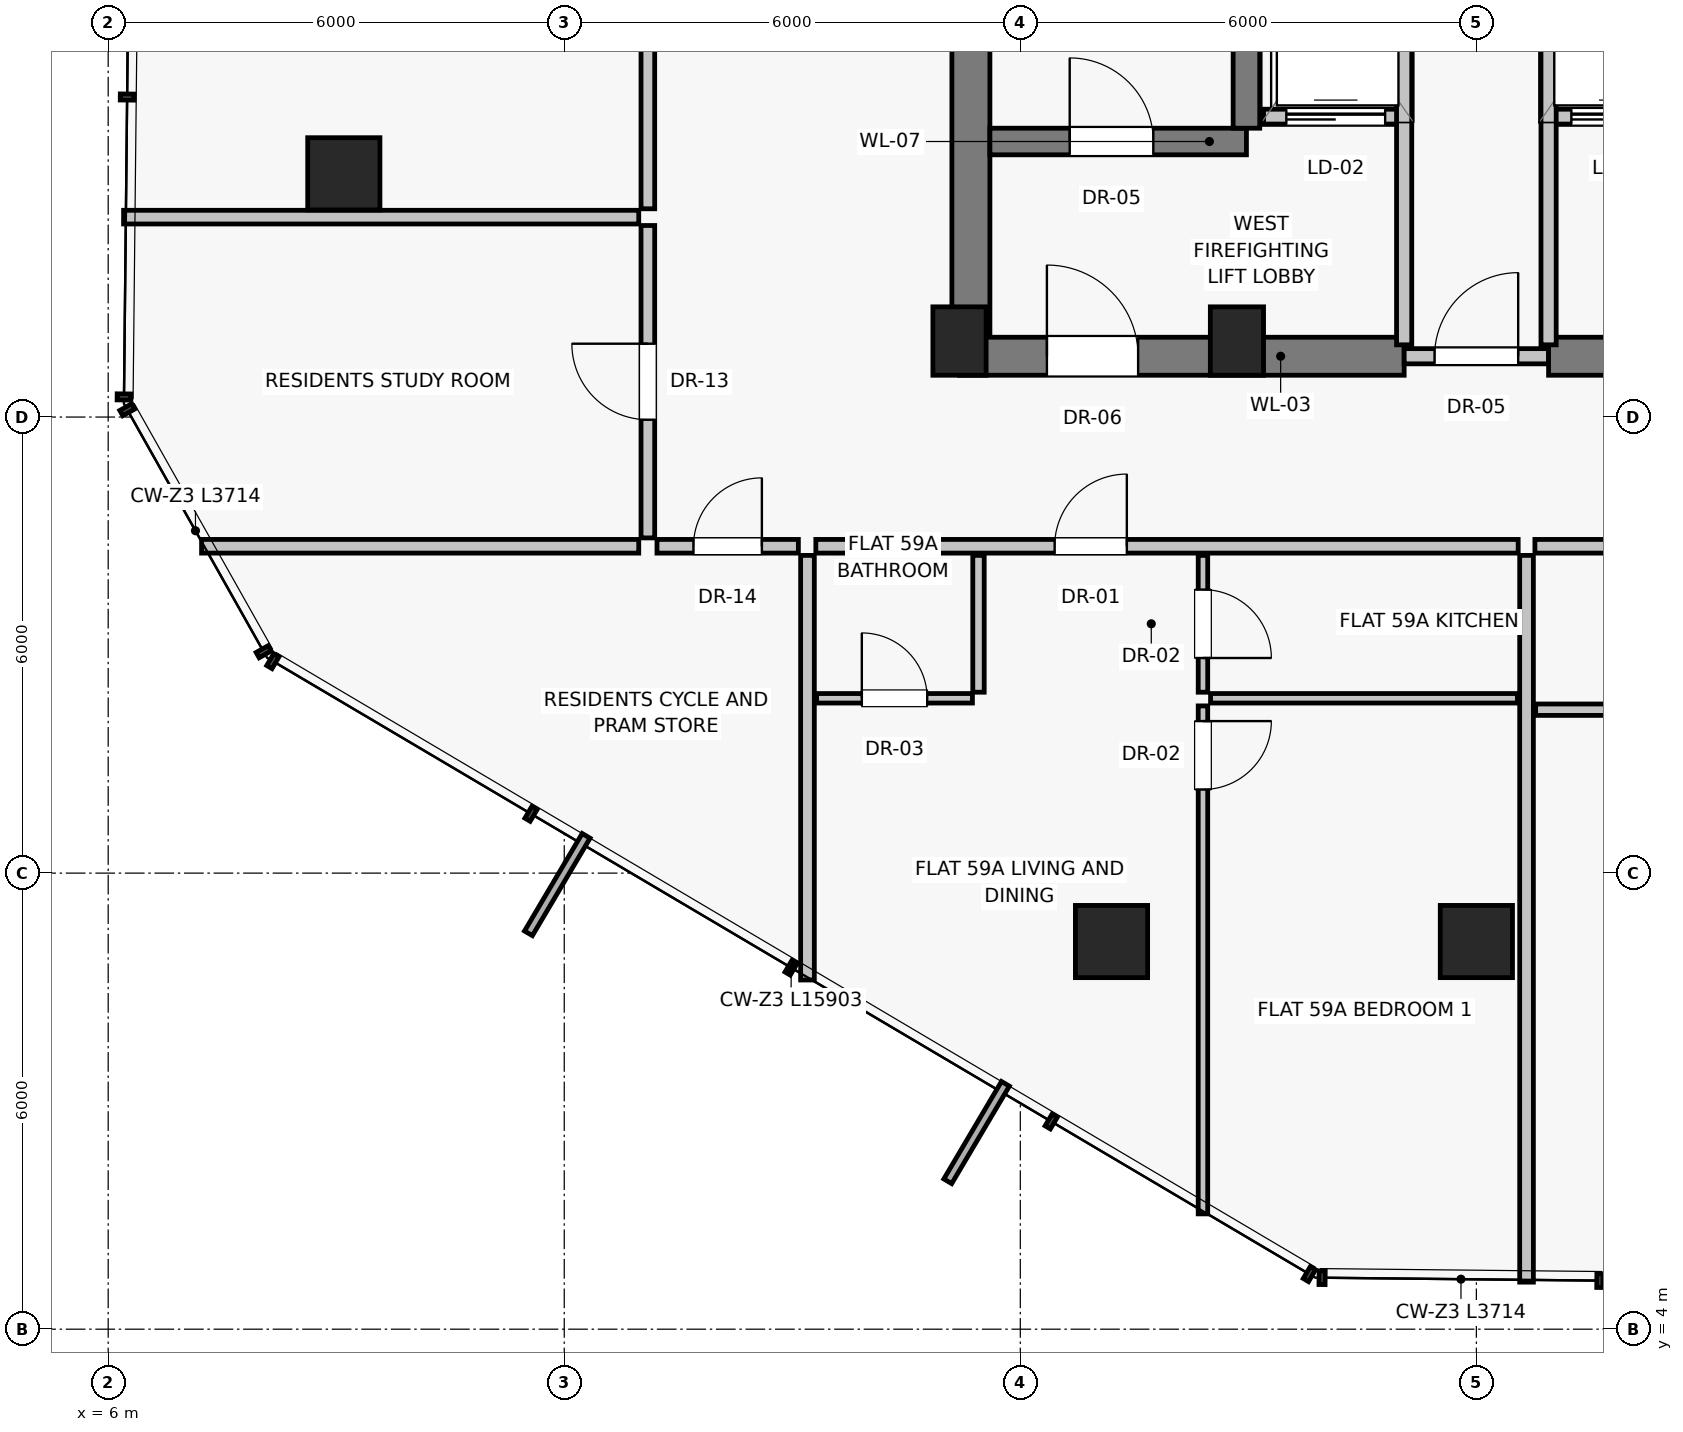
"""IFC4 building model, lengths in metres.
Left out: names, types, materials, properties, quantities, classifications, styles, units other than length and angle.
Written with IfcOpenShell. Run it as: python <this file> out.ifc"""

import sys

from ifc_helpers import new_model, si_unit, direction, frame, frame_2d, origin, origin_2d, place, context, subcontext, project, spatial, rectangle, extrude, source, transform, mapped, element, fill, save


model = new_model("IFC4")
c1 = context("Model", 3, precision=1e-05, world=origin(), true_north=direction((0.0, 1.0)))
c2 = subcontext(c1, "Body", "Model", "MODEL_VIEW")
j1 = project(units=[si_unit("LENGTHUNIT", "METRE"), si_unit("PLANEANGLEUNIT", "RADIAN")], contexts=[c1])
p1 = place(None, origin())
s1 = spatial("IfcSite", under=j1, at=p1, CompositionType="ELEMENT")
p2 = place(p1, origin())
s2 = spatial("IfcBuilding", under=s1, at=p2, CompositionType="ELEMENT")
p3 = place(p2, frame((0.0, 0.0, 208.1)))
s3 = spatial("IfcBuildingStorey", under=s2, at=p3, CompositionType="ELEMENT", Elevation=208.1)
for number, where, z_axis, x_axis in (
    (1, (17.2, 17.0, 0.0), (0.0, 0.0, 1.0), (1.0, 0.0, 0.0)),
    (2, (20.85, 17.0, 0.0), (0.0, 0.0, 1.0), (1.0, 0.0, 0.0)),
):
    element("IfcColumn", number, at=place(p3, frame(where, z_axis=z_axis, x_axis=x_axis)), inside=s3, PredefinedType="PILASTER", context=c2, shape_type="SweptSolid", body=[
        extrude(rectangle(XDim=0.7, YDim=0.9, at=origin_2d()), origin(), (0.0, 0.0, 1.0), 3.25),
    ])
for number, where, z_axis, x_axis in (
    (3, (9.1, 19.2, 0.0), (0.0, 0.0, 1.0), (1.0, 0.0, 0.0)),
    (4, (19.2, 9.1, 0.0), (0.0, 0.0, 1.0), (1.0, 0.0, 0.0)),
    (5, (24.0, 9.1, 0.0), (0.0, 0.0, 1.0), (1.0, 0.0, 0.0)),
):
    element("IfcColumn", number, at=place(p3, frame(where, z_axis=z_axis, x_axis=x_axis)), inside=s3, PredefinedType="COLUMN", context=c2, shape_type="SweptSolid", body=[
        extrude(rectangle(XDim=0.95, YDim=0.95, at=origin_2d()), origin(), (0.0, 0.0, 1.0), 3.25),
    ])
p4 = place(p3, frame((17.35, 16.8, 0.0), z_axis=(0.0, 0.0, 1.0), x_axis=(0.0, 1.0, 0.0)))
e6 = element("IfcWall", 6, at=p4, inside=s3, PredefinedType="SHEAR", context=c2, shape_type="SweptSolid", body=[
    extrude(rectangle(XDim=14.2, YDim=0.5, at=frame_2d((7.1, 0.0))), origin(), (0.0, 0.0, 1.0), 2.97),
])
p5 = place(p3, frame((17.2, 16.8, 0.0), z_axis=(0.0, 0.0, 1.0), x_axis=(1.0, 0.0, 0.0)))
e7 = element("IfcWall", 7, at=p5, inside=s3, PredefinedType="SHEAR", context=c2, shape_type="SweptSolid", body=[
    extrude(rectangle(XDim=5.85, YDim=0.5, at=frame_2d((2.925, 0.0))), origin(), (0.0, 0.0, 1.0), 2.97),
])
p6 = place(p5, frame((1.15, 0.0, 0.0)))
e8 = element("IfcOpeningElement", 8, at=p6, cuts=e7, PredefinedType="OPENING", context=c2, shape_type="SweptSolid", body=[
    extrude(rectangle(XDim=1.2, YDim=2.03, at=frame_2d((0.6, 1.015))), frame((0.0, 0.26, 0.0), z_axis=(0.0, -1.0, 0.0), x_axis=(1.0, 0.0, 0.0)), (0.0, 0.0, 1.0), 0.52),
])
p7 = place(p3, frame((23.05, 16.8, 0.0), z_axis=(0.0, 0.0, 1.0), x_axis=(1.0, 0.0, 0.0)))
e9 = element("IfcWall", 9, at=p7, inside=s3, PredefinedType="SOLIDWALL", context=c2, shape_type="SweptSolid", body=[
    extrude(rectangle(XDim=1.9, YDim=0.2, at=frame_2d((0.95, 0.0))), origin(), (0.0, 0.0, 1.0), 2.12),
])
p8 = place(p7, frame((0.4, 0.0, 0.0)))
e10 = element("IfcOpeningElement", 10, at=p8, cuts=e9, PredefinedType="OPENING", context=c2, shape_type="SweptSolid", body=[
    extrude(rectangle(XDim=1.1, YDim=2.03, at=frame_2d((0.55, 1.015))), frame((0.0, 0.11, 0.0), z_axis=(0.0, -1.0, 0.0), x_axis=(1.0, 0.0, 0.0)), (0.0, 0.0, 1.0), 0.22),
])
p9 = place(p3, frame((24.95, 16.8, 0.0), z_axis=(0.0, 0.0, 1.0), x_axis=(1.0, 0.0, 0.0)))
e11 = element("IfcWall", 11, at=p9, inside=s3, PredefinedType="SHEAR", context=c2, shape_type="SweptSolid", body=[
    extrude(rectangle(XDim=5.85, YDim=0.5, at=frame_2d((2.925, 0.0))), origin(), (0.0, 0.0, 1.0), 2.97),
])
p10 = place(p9, frame((2.15, 0.0, 0.0)))
e12 = element("IfcOpeningElement", 12, at=p10, cuts=e11, PredefinedType="OPENING", context=c2, shape_type="SweptSolid", body=[
    extrude(rectangle(XDim=1.2, YDim=2.03, at=frame_2d((0.6, 1.015))), frame((0.0, 0.26, 0.0), z_axis=(0.0, -1.0, 0.0), x_axis=(1.0, 0.0, 0.0)), (0.0, 0.0, 1.0), 0.52),
])
p11 = place(p3, frame((17.6, 19.625, 0.0), z_axis=(0.0, 0.0, 1.0), x_axis=(1.0, 0.0, 0.0)))
e13 = element("IfcWall", 13, at=p11, inside=s3, PredefinedType="SHEAR", context=c2, shape_type="SweptSolid", body=[
    extrude(rectangle(XDim=3.375, YDim=0.35, at=frame_2d((1.688, 0.0))), origin(), (0.0, 0.0, 1.0), 2.97),
])
p12 = place(p11, frame((1.05, 0.0, 0.0)))
e14 = element("IfcOpeningElement", 14, at=p12, cuts=e13, PredefinedType="OPENING", context=c2, shape_type="SweptSolid", body=[
    extrude(rectangle(XDim=1.1, YDim=2.03, at=frame_2d((0.55, 1.015))), frame((0.0, 0.185, 0.0), z_axis=(0.0, -1.0, 0.0), x_axis=(1.0, 0.0, 0.0)), (0.0, 0.0, 1.0), 0.37),
])
p13 = place(p3, frame((21.2, 19.95, 0.0), z_axis=(0.0, 0.0, 1.0), x_axis=(1.0, 0.0, 0.0)))
e15 = element("IfcWall", 15, at=p13, inside=s3, PredefinedType="SOLIDWALL", context=c2, shape_type="SweptSolid", body=[
    extrude(rectangle(XDim=1.85, YDim=0.2, at=frame_2d((0.925, 0.0))), origin(), (0.0, 0.0, 1.0), 2.97),
])
p14 = place(p13, frame((0.3, 0.0, 0.0)))
e16 = element("IfcOpeningElement", 16, at=p14, cuts=e15, PredefinedType="OPENING", context=c2, shape_type="SweptSolid", body=[
    extrude(rectangle(XDim=1.3, YDim=2.25, at=frame_2d((0.65, 1.125))), frame((0.0, 0.11, 0.0), z_axis=(0.0, -1.0, 0.0), x_axis=(1.0, 0.0, 0.0)), (0.0, 0.0, 1.0), 0.22),
])
p15 = place(p3, frame((24.95, 19.95, 0.0), z_axis=(0.0, 0.0, 1.0), x_axis=(1.0, 0.0, 0.0)))
e17 = element("IfcWall", 17, at=p15, inside=s3, PredefinedType="SOLIDWALL", context=c2, shape_type="SweptSolid", body=[
    extrude(rectangle(XDim=1.85, YDim=0.2, at=frame_2d((0.925, 0.0))), origin(), (0.0, 0.0, 1.0), 2.97),
])
p16 = place(p15, frame((0.3, 0.0, 0.0)))
e18 = element("IfcOpeningElement", 18, at=p16, cuts=e17, PredefinedType="OPENING", context=c2, shape_type="SweptSolid", body=[
    extrude(rectangle(XDim=1.3, YDim=2.25, at=frame_2d((0.65, 1.125))), frame((0.0, 0.11, 0.0), z_axis=(0.0, -1.0, 0.0), x_axis=(1.0, 0.0, 0.0)), (0.0, 0.0, 1.0), 0.22),
])
p17 = place(p3, frame((20.975, 19.8, 0.0), z_axis=(0.0, 0.0, 1.0), x_axis=(0.0, 1.0, 0.0)))
e19 = element("IfcWall", 19, at=p17, inside=s3, PredefinedType="SHEAR", context=c2, shape_type="SweptSolid", body=[
    extrude(rectangle(XDim=8.775, YDim=0.35, at=frame_2d((4.387, 0.0))), origin(), (0.0, 0.0, 1.0), 2.97),
])
for number, where, z_axis, x_axis in (
    (20, (23.05, 16.95, 0.0), (0.0, 0.0, 1.0), (0.0, 1.0, 0.0)),
    (21, (24.95, 16.95, 0.0), (0.0, 0.0, 1.0), (0.0, 1.0, 0.0)),
):
    element("IfcWall", number, at=place(p3, frame(where, z_axis=z_axis, x_axis=x_axis)), inside=s3, PredefinedType="SOLIDWALL", context=c2, shape_type="SweptSolid", body=[
        extrude(rectangle(XDim=5.6, YDim=0.2, at=frame_2d((2.8, 0.0))), origin(), (0.0, 0.0, 1.0), 2.97),
    ])
p18 = place(p3, frame((15.2, 14.18, 0.0), z_axis=(0.0, 0.0, 1.0), x_axis=(0.0, -1.0, 0.0)))
e22 = element("IfcWall", 22, at=p18, inside=s3, PredefinedType="PARTITIONING", context=c2, shape_type="SweptSolid", body=[
    extrude(rectangle(XDim=5.586, YDim=0.18, at=frame_2d((2.793, 0.0))), origin(), (0.0, 0.0, 1.0), 2.97),
])
p19 = place(p3, frame((15.31, 14.3, 0.0), z_axis=(0.0, 0.0, 1.0), x_axis=(1.0, 0.0, 0.0)))
e23 = element("IfcWall", 23, at=p19, inside=s3, PredefinedType="PARTITIONING", context=c2, shape_type="SweptSolid", body=[
    extrude(rectangle(XDim=9.24, YDim=0.18, at=frame_2d((4.62, 0.0))), origin(), (0.0, 0.0, 1.0), 2.97),
])
p20 = place(p19, frame((3.142, 0.0, 0.0)))
e24 = element("IfcOpeningElement", 24, at=p20, cuts=e23, PredefinedType="OPENING", context=c2, shape_type="SweptSolid", body=[
    extrude(rectangle(XDim=0.95, YDim=2.02, at=frame_2d((0.475, 1.01))), frame((0.0, 0.1, 0.0), z_axis=(0.0, -1.0, 0.0), x_axis=(1.0, 0.0, 0.0)), (0.0, 0.0, 1.0), 0.2),
])
p21 = place(p3, frame((17.45, 14.18, 0.0), z_axis=(0.0, 0.0, 1.0), x_axis=(0.0, -1.0, 0.0)))
e25 = element("IfcWall", 25, at=p21, inside=s3, PredefinedType="PARTITIONING", context=c2, shape_type="SweptSolid", body=[
    extrude(rectangle(XDim=1.8, YDim=0.15, at=frame_2d((0.9, 0.0))), origin(), (0.0, 0.0, 1.0), 2.97),
])
p22 = place(p3, frame((15.32, 12.3, 0.0), z_axis=(0.0, 0.0, 1.0), x_axis=(1.0, 0.0, 0.0)))
e26 = element("IfcWall", 26, at=p22, inside=s3, PredefinedType="PARTITIONING", context=c2, shape_type="SweptSolid", body=[
    extrude(rectangle(XDim=2.05, YDim=0.125, at=frame_2d((1.025, 0.0))), origin(), (0.0, 0.0, 1.0), 2.97),
])
p23 = place(p22, frame((0.595, 0.0, 0.0)))
e27 = element("IfcOpeningElement", 27, at=p23, cuts=e26, PredefinedType="OPENING", context=c2, shape_type="SweptSolid", body=[
    extrude(rectangle(XDim=0.86, YDim=2.01, at=frame_2d((0.43, 1.005))), frame((0.0, 0.073, 0.0), z_axis=(0.0, -1.0, 0.0), x_axis=(1.0, 0.0, 0.0)), (0.0, 0.0, 1.0), 0.145),
])
p24 = place(p3, frame((20.403, 14.18, 0.0), z_axis=(0.0, 0.0, 1.0), x_axis=(0.0, -1.0, 0.0)))
e28 = element("IfcWall", 28, at=p24, inside=s3, PredefinedType="PARTITIONING", context=c2, shape_type="SweptSolid", body=[
    extrude(rectangle(XDim=1.8, YDim=0.125, at=frame_2d((0.9, 0.0))), origin(), (0.0, 0.0, 1.0), 2.424),
])
p25 = place(p24, frame((0.45, 0.0, 0.0)))
e29 = element("IfcOpeningElement", 29, at=p25, cuts=e28, PredefinedType="OPENING", context=c2, shape_type="SweptSolid", body=[
    extrude(rectangle(XDim=0.9, YDim=2.01, at=frame_2d((0.45, 1.005))), frame((0.0, 0.073, 0.0), z_axis=(0.0, -1.0, 0.0), x_axis=(1.0, 0.0, 0.0)), (0.0, 0.0, 1.0), 0.145),
])
p26 = place(p3, frame((20.503, 12.3, 0.0), z_axis=(0.0, 0.0, 1.0), x_axis=(1.0, 0.0, 0.0)))
e30 = element("IfcWall", 30, at=p26, inside=s3, PredefinedType="PARTITIONING", context=c2, shape_type="SweptSolid", body=[
    extrude(rectangle(XDim=4.037, YDim=0.125, at=frame_2d((2.019, 0.0))), origin(), (0.0, 0.0, 1.0), 2.97),
])
p27 = place(p3, frame((20.403, 12.2, 0.0), z_axis=(0.0, 0.0, 1.0), x_axis=(0.0, -1.0, 0.0)))
e31 = element("IfcWall", 31, at=p27, inside=s3, PredefinedType="PARTITIONING", context=c2, shape_type="SweptSolid", body=[
    extrude(rectangle(XDim=6.683, YDim=0.125, at=frame_2d((3.342, 0.0))), origin(), (0.0, 0.0, 1.0), 2.97),
])
p28 = place(p27, frame((0.2, 0.0, 0.0)))
e32 = element("IfcOpeningElement", 32, at=p28, cuts=e31, PredefinedType="OPENING", context=c2, shape_type="SweptSolid", body=[
    extrude(rectangle(XDim=0.9, YDim=2.01, at=frame_2d((0.45, 1.005))), frame((0.0, 0.073, 0.0), z_axis=(0.0, -1.0, 0.0), x_axis=(1.0, 0.0, 0.0)), (0.0, 0.0, 1.0), 0.145),
])
p29 = place(p3, frame((24.66, 14.18, 0.0), z_axis=(0.0, 0.0, 1.0), x_axis=(0.0, -1.0, 0.0)))
e33 = element("IfcWall", 33, at=p29, inside=s3, PredefinedType="PARTITIONING", context=c2, shape_type="SweptSolid", body=[
    extrude(rectangle(XDim=9.561, YDim=0.18, at=frame_2d((4.781, 0.0))), origin(), (0.0, 0.0, 1.0), 2.97),
])
p30 = place(p3, frame((24.77, 14.3, 0.0), z_axis=(0.0, 0.0, 1.0), x_axis=(1.0, 0.0, 0.0)))
e34 = element("IfcWall", 34, at=p30, inside=s3, PredefinedType="PARTITIONING", context=c2, shape_type="SweptSolid", body=[
    extrude(rectangle(XDim=6.32, YDim=0.18, at=frame_2d((3.16, 0.0))), origin(), (0.0, 0.0, 1.0), 2.97),
])
p31 = place(p30, frame((3.878, 0.0, 0.0)))
e35 = element("IfcOpeningElement", 35, at=p31, cuts=e34, PredefinedType="OPENING", context=c2, shape_type="SweptSolid", body=[
    extrude(rectangle(XDim=0.95, YDim=2.02, at=frame_2d((0.475, 1.01))), frame((0.0, 0.1, 0.0), z_axis=(0.0, -1.0, 0.0), x_axis=(1.0, 0.0, 0.0)), (0.0, 0.0, 1.0), 0.2),
])
p32 = place(p3, frame((24.78, 12.15, 0.0), z_axis=(0.0, 0.0, 1.0), x_axis=(1.0, 0.0, 0.0)))
e36 = element("IfcWall", 36, at=p32, inside=s3, PredefinedType="PARTITIONING", context=c2, shape_type="SweptSolid", body=[
    extrude(rectangle(XDim=2.15, YDim=0.15, at=frame_2d((1.075, 0.0))), origin(), (0.0, 0.0, 1.0), 2.97),
])
p33 = place(p3, frame((12.98, 14.3, 0.0), z_axis=(0.0, 0.0, 1.0), x_axis=(-1.0, 0.0, 0.0)))
e37 = element("IfcWall", 37, at=p33, inside=s3, PredefinedType="PARTITIONING", context=c2, shape_type="SweptSolid", body=[
    extrude(rectangle(XDim=5.751, YDim=0.18, at=frame_2d((2.875, 0.0))), origin(), (0.0, 0.0, 1.0), 2.97),
])
p34 = place(p3, frame((13.1, 14.41, 0.0), z_axis=(0.0, 0.0, 1.0), x_axis=(0.0, 1.0, 0.0)))
e38 = element("IfcWall", 38, at=p34, inside=s3, PredefinedType="PARTITIONING", context=c2, shape_type="SweptSolid", body=[
    extrude(rectangle(XDim=4.11, YDim=0.18, at=frame_2d((2.055, 0.0))), origin(), (0.0, 0.0, 1.0), 2.617),
])
p35 = place(p34, frame((1.555, 0.0, 0.0)))
e39 = element("IfcOpeningElement", 39, at=p35, cuts=e38, PredefinedType="OPENING", context=c2, shape_type="SweptSolid", body=[
    extrude(rectangle(XDim=1.0, YDim=2.01, at=frame_2d((0.5, 1.005))), frame((0.0, 0.1, 0.0), z_axis=(0.0, -1.0, 0.0), x_axis=(1.0, 0.0, 0.0)), (0.0, 0.0, 1.0), 0.2),
])
p36 = place(p3, frame((13.1, 18.74, 0.0), z_axis=(0.0, 0.0, 1.0), x_axis=(0.0, 1.0, 0.0)))
e40 = element("IfcWall", 40, at=p36, inside=s3, PredefinedType="PARTITIONING", context=c2, shape_type="SweptSolid", body=[
    extrude(rectangle(XDim=6.844, YDim=0.18, at=frame_2d((3.422, 0.0))), origin(), (0.0, 0.0, 1.0), 2.617),
])
p37 = place(p36, frame((2.922, 0.0, 0.0)))
e41 = element("IfcOpeningElement", 41, at=p37, cuts=e40, PredefinedType="OPENING", context=c2, shape_type="SweptSolid", body=[
    extrude(rectangle(XDim=1.0, YDim=2.01, at=frame_2d((0.5, 1.005))), frame((0.0, 0.1, 0.0), z_axis=(0.0, -1.0, 0.0), x_axis=(1.0, 0.0, 0.0)), (0.0, 0.0, 1.0), 0.2),
])
p38 = place(p3, frame((12.98, 18.63, 0.0), z_axis=(0.0, 0.0, 1.0), x_axis=(-1.0, 0.0, 0.0)))
e42 = element("IfcWall", 42, at=p38, inside=s3, PredefinedType="PARTITIONING", context=c2, shape_type="SweptSolid", body=[
    extrude(rectangle(XDim=6.777, YDim=0.18, at=frame_2d((3.389, 0.0))), origin(), (0.0, 0.0, 1.0), 2.424),
])
p39 = place(p3, frame((13.22, 14.3, 0.0), z_axis=(0.0, 0.0, 1.0), x_axis=(1.0, 0.0, 0.0)))
e43 = element("IfcWall", 43, at=p39, inside=s3, PredefinedType="PARTITIONING", context=c2, shape_type="SweptSolid", body=[
    extrude(rectangle(XDim=1.86, YDim=0.18, at=frame_2d((0.93, 0.0))), origin(), (0.0, 0.0, 1.0), 2.97),
])
p40 = place(p39, frame((0.48, 0.0, 0.0)))
e44 = element("IfcOpeningElement", 44, at=p40, cuts=e43, PredefinedType="OPENING", context=c2, shape_type="SweptSolid", body=[
    extrude(rectangle(XDim=0.9, YDim=2.01, at=frame_2d((0.45, 1.005))), frame((0.0, 0.1, 0.0), z_axis=(0.0, -1.0, 0.0), x_axis=(1.0, 0.0, 0.0)), (0.0, 0.0, 1.0), 0.2),
])
m1 = source(origin(), c2, "Body", "SweptSolid", [
    extrude(rectangle(XDim=1.2, YDim=2.03, at=frame_2d((0.6, 1.015))), frame((0.0, 0.025, 0.0), z_axis=(0.0, -1.0, 0.0), x_axis=(1.0, 0.0, 0.0)), (0.0, 0.0, 1.0), 0.05),
])
p41 = place(p6, origin())
e45 = element("IfcDoor", 45, at=p41, inside=s3, OperationType="SINGLE_SWING_LEFT", PredefinedType="DOOR", context=c2, shape_type="MappedRepresentation", body=[
    mapped(m1, transform((0.0, 0.0, 0.0), scale=1.0)),
])
fill(e8, e45)
m2 = source(origin(), c2, "Body", "SweptSolid", [
    extrude(rectangle(XDim=1.1, YDim=2.03, at=frame_2d((0.55, 1.015))), frame((0.0, 0.025, 0.0), z_axis=(0.0, -1.0, 0.0), x_axis=(1.0, 0.0, 0.0)), (0.0, 0.0, 1.0), 0.05),
])
p42 = place(p8, origin())
e46 = element("IfcDoor", 46, at=p42, inside=s3, OperationType="SINGLE_SWING_RIGHT", PredefinedType="DOOR", context=c2, shape_type="MappedRepresentation", body=[
    mapped(m2, transform((0.0, 0.0, 0.0), scale=1.0)),
])
fill(e10, e46)
p43 = place(p12, origin())
e47 = element("IfcDoor", 47, at=p43, inside=s3, OperationType="SINGLE_SWING_LEFT", PredefinedType="DOOR", context=c2, shape_type="MappedRepresentation", body=[
    mapped(m2, transform((0.0, 0.0, 0.0), scale=1.0)),
])
fill(e14, e47)
m3 = source(origin(), c2, "Body", "SweptSolid", [
    extrude(rectangle(XDim=1.3, YDim=2.25, at=frame_2d((0.65, 1.125))), frame((0.0, 0.025, 0.0), z_axis=(0.0, -1.0, 0.0), x_axis=(1.0, 0.0, 0.0)), (0.0, 0.0, 1.0), 0.05),
])
p44 = place(p14, origin())
e48 = element("IfcDoor", 48, at=p44, inside=s3, OperationType="SLIDING_TO_LEFT", PredefinedType="DOOR", context=c2, shape_type="MappedRepresentation", body=[
    mapped(m3, transform((0.0, 0.0, 0.0), scale=1.0)),
])
fill(e16, e48)
p45 = place(p16, origin())
e49 = element("IfcDoor", 49, at=p45, inside=s3, OperationType="SLIDING_TO_LEFT", PredefinedType="DOOR", context=c2, shape_type="MappedRepresentation", body=[
    mapped(m3, transform((0.0, 0.0, 0.0), scale=1.0)),
])
fill(e18, e49)
m4 = source(origin(), c2, "Body", "SweptSolid", [
    extrude(rectangle(XDim=0.95, YDim=2.02, at=frame_2d((0.475, 1.01))), frame((0.0, 0.025, 0.0), z_axis=(0.0, -1.0, 0.0), x_axis=(1.0, 0.0, 0.0)), (0.0, 0.0, 1.0), 0.05),
])
p46 = place(p20, origin())
e50 = element("IfcDoor", 50, at=p46, inside=s3, OperationType="SINGLE_SWING_RIGHT", PredefinedType="DOOR", context=c2, shape_type="MappedRepresentation", body=[
    mapped(m4, transform((0.0, 0.0, 0.0), scale=1.0)),
])
fill(e24, e50)
m5 = source(origin(), c2, "Body", "SweptSolid", [
    extrude(rectangle(XDim=0.86, YDim=2.01, at=frame_2d((0.43, 1.005))), frame((0.0, 0.025, 0.0), z_axis=(0.0, -1.0, 0.0), x_axis=(1.0, 0.0, 0.0)), (0.0, 0.0, 1.0), 0.05),
])
p47 = place(p23, origin())
e51 = element("IfcDoor", 51, at=p47, inside=s3, OperationType="SINGLE_SWING_LEFT", PredefinedType="DOOR", context=c2, shape_type="MappedRepresentation", body=[
    mapped(m5, transform((0.0, 0.0, 0.0), scale=1.0)),
])
fill(e27, e51)
m6 = source(origin(), c2, "Body", "SweptSolid", [
    extrude(rectangle(XDim=0.9, YDim=2.01, at=frame_2d((0.45, 1.005))), frame((0.0, 0.025, 0.0), z_axis=(0.0, -1.0, 0.0), x_axis=(1.0, 0.0, 0.0)), (0.0, 0.0, 1.0), 0.05),
])
p48 = place(p25, origin())
e52 = element("IfcDoor", 52, at=p48, inside=s3, OperationType="SINGLE_SWING_RIGHT", PredefinedType="DOOR", context=c2, shape_type="MappedRepresentation", body=[
    mapped(m6, transform((0.0, 0.0, 0.0), scale=1.0)),
])
fill(e29, e52)
p49 = place(p28, origin())
e53 = element("IfcDoor", 53, at=p49, inside=s3, OperationType="SINGLE_SWING_LEFT", PredefinedType="DOOR", context=c2, shape_type="MappedRepresentation", body=[
    mapped(m6, transform((0.0, 0.0, 0.0), scale=1.0)),
])
fill(e32, e53)
m7 = source(origin(), c2, "Body", "SweptSolid", [
    extrude(rectangle(XDim=1.0, YDim=2.01, at=frame_2d((0.5, 1.005))), frame((0.0, 0.025, 0.0), z_axis=(0.0, -1.0, 0.0), x_axis=(1.0, 0.0, 0.0)), (0.0, 0.0, 1.0), 0.05),
])
p50 = place(p35, origin())
e54 = element("IfcDoor", 54, at=p50, inside=s3, OperationType="SINGLE_SWING_RIGHT", PredefinedType="DOOR", context=c2, shape_type="MappedRepresentation", body=[
    mapped(m7, transform((0.0, 0.0, 0.0), scale=1.0)),
])
fill(e39, e54)
p51 = place(p40, origin())
e55 = element("IfcDoor", 55, at=p51, inside=s3, OperationType="SINGLE_SWING_RIGHT", PredefinedType="DOOR", context=c2, shape_type="MappedRepresentation", body=[
    mapped(m6, transform((0.0, 0.0, 0.0), scale=1.0)),
])
fill(e44, e55)
save(model, sys.argv[1])
